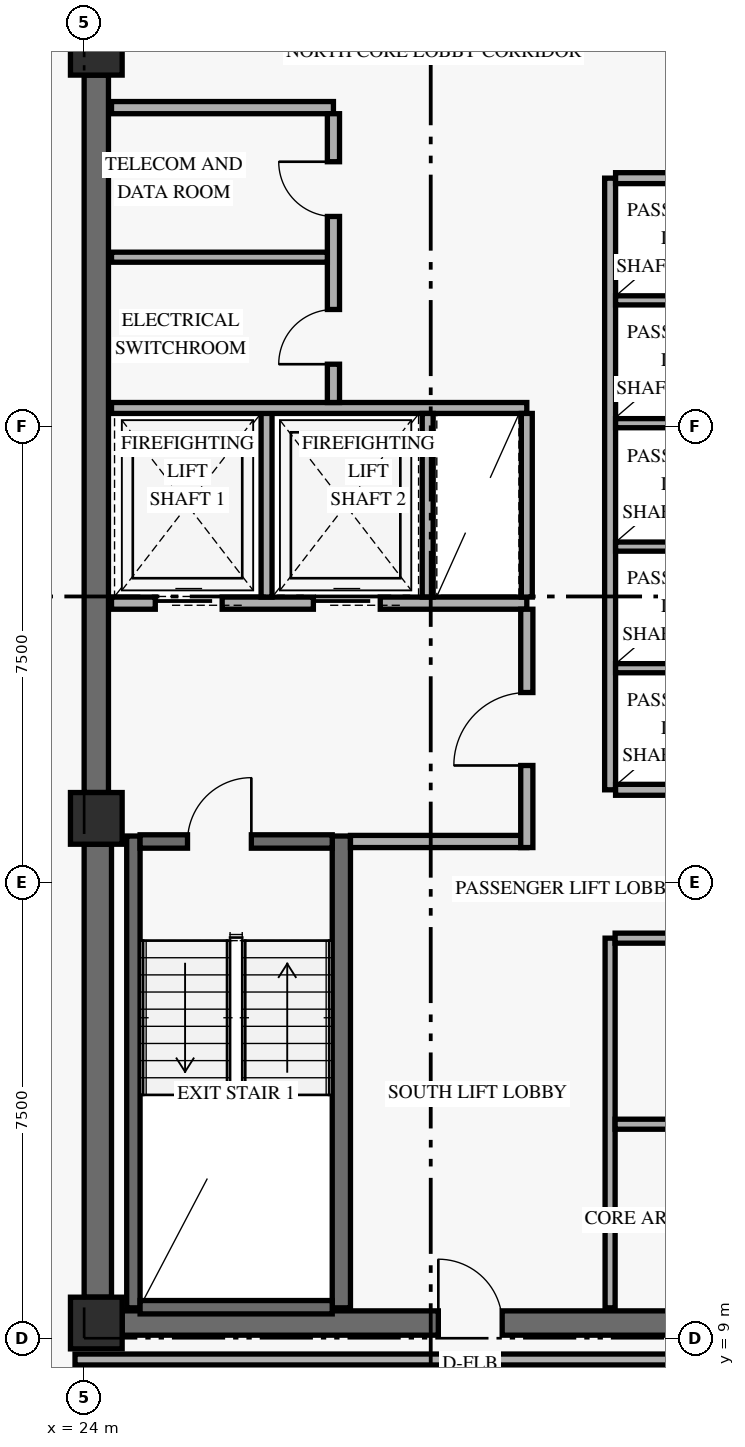
"""IFC4 building model, lengths in metres.
Left out: names, types, materials, properties, quantities, classifications, styles, units other than length and angle.
Written with IfcOpenShell. Run it as: python <this file> out.ifc"""

import sys

from ifc_helpers import new_model, si_unit, direction, frame, frame_2d, origin, origin_2d, place, context, subcontext, project, spatial, rectangle, extrude, element, fill, save


model = new_model("IFC4")
c1 = context("Model", 3, precision=1e-05, world=origin(), true_north=direction((0.0, 1.0)))
c2 = subcontext(c1, "Body", "Model", "MODEL_VIEW")
j1 = project(units=[si_unit("LENGTHUNIT", "METRE"), si_unit("PLANEANGLEUNIT", "RADIAN")], contexts=[c1])
p1 = place(None, origin())
s1 = spatial("IfcSite", under=j1, at=p1, CompositionType="ELEMENT")
p2 = place(p1, origin())
s2 = spatial("IfcBuilding", under=s1, at=p2, CompositionType="ELEMENT")
p3 = place(p2, frame((0.0, 0.0, 109.8)))
s3 = spatial("IfcBuildingStorey", under=s2, at=p3, CompositionType="ELEMENT", Elevation=109.8)
p4 = place(p3, frame((24.225, 9.675, 0.0), z_axis=(0.0, 0.0, 1.0), x_axis=(0.0, 1.0, 0.0)))
e1 = element("IfcWall", 1, at=p4, inside=s3, PredefinedType="SHEAR", context=c2, shape_type="SweptSolid", body=[
    extrude(rectangle(XDim=7.45, YDim=0.45, at=frame_2d((3.725, 0.0))), origin(), (0.0, 0.0, 1.0), 2.749),
])
p5 = place(p3, frame((24.2, 17.975, 0.0), z_axis=(0.0, 0.0, 1.0), x_axis=(0.0, 1.0, 0.0)))
e2 = element("IfcWall", 2, at=p5, inside=s3, PredefinedType="SHEAR", context=c2, shape_type="SweptSolid", body=[
    extrude(rectangle(XDim=11.8, YDim=0.4, at=frame_2d((5.9, 0.0))), origin(), (0.0, 0.0, 1.0), 2.749),
])
p6 = place(p3, frame((24.625, 9.25, 0.0), z_axis=(0.0, 0.0, 1.0), x_axis=(1.0, 0.0, 0.0)))
e3 = element("IfcWall", 3, at=p6, inside=s3, PredefinedType="SHEAR", context=c2, shape_type="SweptSolid", body=[
    extrude(rectangle(XDim=10.15, YDim=0.4, at=frame_2d((5.075, 0.0))), origin(), (0.0, 0.0, 1.0), 3.36),
])
p7 = place(p6, frame((5.2, 0.0, 0.0)))
e4 = element("IfcOpeningElement", 4, at=p7, cuts=e3, PredefinedType="OPENING", context=c2, shape_type="SweptSolid", body=[
    extrude(rectangle(XDim=1.05, YDim=2.15, at=frame_2d((0.525, 1.075))), frame((0.0, 0.21, 0.0), z_axis=(0.0, -1.0, 0.0), x_axis=(1.0, 0.0, 0.0)), (0.0, 0.0, 1.0), 0.42),
])
p8 = place(p3, frame((24.81, 9.5, 0.0), z_axis=(0.0, 0.0, 1.0), x_axis=(0.0, 1.0, 0.0)))
e5 = element("IfcWall", 5, at=p8, inside=s3, PredefinedType="SHEAR", context=c2, shape_type="SweptSolid", body=[
    extrude(rectangle(XDim=7.76, YDim=0.22, at=frame_2d((3.88, 0.0))), origin(), (0.0, 0.0, 1.0), 3.36),
])
p9 = place(p3, frame((28.23, 9.5, 0.0), z_axis=(0.0, 0.0, 1.0), x_axis=(0.0, 1.0, 0.0)))
e6 = element("IfcWall", 6, at=p9, inside=s3, PredefinedType="SHEAR", context=c2, shape_type="SweptSolid", body=[
    extrude(rectangle(XDim=7.76, YDim=0.3, at=frame_2d((3.88, 0.0))), origin(), (0.0, 0.0, 1.0), 3.36),
])
p10 = place(p3, frame((24.92, 9.51, 0.0), z_axis=(0.0, 0.0, 1.0), x_axis=(1.0, 0.0, 0.0)))
e7 = element("IfcWall", 7, at=p10, inside=s3, PredefinedType="SHEAR", context=c2, shape_type="SweptSolid", body=[
    extrude(rectangle(XDim=3.16, YDim=0.22, at=frame_2d((1.58, 0.0))), origin(), (0.0, 0.0, 1.0), 3.36),
])
p11 = place(p3, frame((24.92, 17.17, 0.0), z_axis=(0.0, 0.0, 1.0), x_axis=(1.0, 0.0, 0.0)))
e8 = element("IfcWall", 8, at=p11, inside=s3, PredefinedType="SHEAR", context=c2, shape_type="SweptSolid", body=[
    extrude(rectangle(XDim=3.16, YDim=0.22, at=frame_2d((1.58, 0.0))), origin(), (0.0, 0.0, 1.0), 3.36),
])
p12 = place(p11, frame((0.78, 0.0, 0.0)))
e9 = element("IfcOpeningElement", 9, at=p12, cuts=e8, PredefinedType="OPENING", context=c2, shape_type="SweptSolid", body=[
    extrude(rectangle(XDim=1.05, YDim=2.15, at=frame_2d((0.525, 1.075))), frame((0.0, 0.12, 0.0), z_axis=(0.0, -1.0, 0.0), x_axis=(1.0, 0.0, 0.0)), (0.0, 0.0, 1.0), 0.24),
])
for number, where, z_axis, x_axis in (
    (10, (24.2, 9.25, 0.0), (0.0, 0.0, 1.0), (1.0, 0.0, 0.0)),
    (11, (24.2, 17.55, 0.0), (0.0, 0.0, 1.0), (1.0, 0.0, 0.0)),
    (12, (24.2, 30.2, 0.0), (0.0, 0.0, 1.0), (1.0, 0.0, 0.0)),
):
    element("IfcColumn", number, at=place(p3, frame(where, z_axis=z_axis, x_axis=x_axis)), inside=s3, PredefinedType="COLUMN", context=c2, shape_type="SweptSolid", body=[
        extrude(rectangle(XDim=0.85, YDim=0.85, at=origin_2d()), origin(), (0.0, 0.0, 1.0), 3.6),
    ])
p13 = place(p3, frame((24.45, 21.09, 0.0), z_axis=(0.0, 0.0, 1.0), x_axis=(1.0, 0.0, 0.0)))
e13 = element("IfcWall", 13, at=p13, inside=s3, PredefinedType="STANDARD", context=c2, shape_type="SweptSolid", body=[
    extrude(rectangle(XDim=6.83, YDim=0.2, at=frame_2d((3.415, 0.0))), origin(), (0.0, 0.0, 1.0), 3.36),
])
p14 = place(p13, frame((0.72, 0.0, 0.0)))
e14 = element("IfcOpeningElement", 14, at=p14, cuts=e13, PredefinedType="OPENING", context=c2, shape_type="SweptSolid", body=[
    extrude(rectangle(XDim=1.1, YDim=2.2, at=frame_2d((0.55, 1.1))), frame((0.0, 0.11, 0.0), z_axis=(0.0, -1.0, 0.0), x_axis=(1.0, 0.0, 0.0)), (0.0, 0.0, 1.0), 0.22),
])
p15 = place(p13, frame((3.32, 0.0, 0.0)))
e15 = element("IfcOpeningElement", 15, at=p15, cuts=e13, PredefinedType="OPENING", context=c2, shape_type="SweptSolid", body=[
    extrude(rectangle(XDim=1.1, YDim=2.2, at=frame_2d((0.55, 1.1))), frame((0.0, 0.11, 0.0), z_axis=(0.0, -1.0, 0.0), x_axis=(1.0, 0.0, 0.0)), (0.0, 0.0, 1.0), 0.22),
])
p16 = place(p3, frame((28.38, 17.17, 0.0), z_axis=(0.0, 0.0, 1.0), x_axis=(1.0, 0.0, 0.0)))
e16 = element("IfcWall", 16, at=p16, inside=s3, PredefinedType="STANDARD", context=c2, shape_type="SweptSolid", body=[
    extrude(rectangle(XDim=2.9, YDim=0.2, at=frame_2d((1.45, 0.0))), origin(), (0.0, 0.0, 1.0), 3.36),
])
p17 = place(p3, frame((31.28, 17.07, 0.0), z_axis=(0.0, 0.0, 1.0), x_axis=(0.0, 1.0, 0.0)))
e17 = element("IfcWall", 17, at=p17, inside=s3, PredefinedType="STANDARD", context=c2, shape_type="SweptSolid", body=[
    extrude(rectangle(XDim=3.92, YDim=0.2, at=frame_2d((1.96, 0.0))), origin(), (0.0, 0.0, 1.0), 2.731),
])
p18 = place(p17, frame((1.35, 0.0, 0.0)))
e18 = element("IfcOpeningElement", 18, at=p18, cuts=e17, PredefinedType="OPENING", context=c2, shape_type="SweptSolid", body=[
    extrude(rectangle(XDim=1.2, YDim=2.15, at=frame_2d((0.6, 1.075))), frame((0.0, 0.11, 0.0), z_axis=(0.0, -1.0, 0.0), x_axis=(1.0, 0.0, 0.0)), (0.0, 0.0, 1.0), 0.22),
])
p19 = place(p3, frame((27.0, 21.19, 0.0), z_axis=(0.0, 0.0, 1.0), x_axis=(0.0, 1.0, 0.0)))
e19 = element("IfcWall", 19, at=p19, inside=s3, PredefinedType="STANDARD", context=c2, shape_type="SweptSolid", body=[
    extrude(rectangle(XDim=3.11, YDim=0.18, at=frame_2d((1.555, 0.0))), origin(), (0.0, 0.0, 1.0), 3.36),
])
p20 = place(p3, frame((24.45, 24.3, 0.0), z_axis=(0.0, 0.0, 1.0), x_axis=(1.0, 0.0, 0.0)))
e20 = element("IfcWall", 20, at=p20, inside=s3, PredefinedType="STANDARD", context=c2, shape_type="SweptSolid", body=[
    extrude(rectangle(XDim=6.83, YDim=0.18, at=frame_2d((3.415, 0.0))), origin(), (0.0, 0.0, 1.0), 3.36),
])
for number, where, z_axis, x_axis in (
    (21, (29.65, 21.19, 0.0), (0.0, 0.0, 1.0), (0.0, 1.0, 0.0)),
    (22, (31.28, 21.19, 0.0), (0.0, 0.0, 1.0), (0.0, 1.0, 0.0)),
):
    element("IfcWall", number, at=place(p3, frame(where, z_axis=z_axis, x_axis=x_axis)), inside=s3, PredefinedType="STANDARD", context=c2, shape_type="SweptSolid", body=[
        extrude(rectangle(XDim=3.02, YDim=0.18, at=frame_2d((1.51, 0.0))), origin(), (0.0, 0.0, 1.0), 3.36),
    ])
p21 = place(p3, frame((24.45, 29.24, 0.0), z_axis=(0.0, 0.0, 1.0), x_axis=(1.0, 0.0, 0.0)))
e23 = element("IfcWall", 23, at=p21, inside=s3, PredefinedType="STANDARD", context=c2, shape_type="SweptSolid", body=[
    extrude(rectangle(XDim=3.65, YDim=0.2, at=frame_2d((1.825, 0.0))), origin(), (0.0, 0.0, 1.0), 3.36),
])
p22 = place(p3, frame((28.1, 24.39, 0.0), z_axis=(0.0, 0.0, 1.0), x_axis=(0.0, 1.0, 0.0)))
e24 = element("IfcWall", 24, at=p22, inside=s3, PredefinedType="STANDARD", context=c2, shape_type="SweptSolid", body=[
    extrude(rectangle(XDim=4.75, YDim=0.2, at=frame_2d((2.375, 0.0))), origin(), (0.0, 0.0, 1.0), 3.36),
])
p23 = place(p22, frame((0.63, 0.0, 0.0)))
e25 = element("IfcOpeningElement", 25, at=p23, cuts=e24, PredefinedType="OPENING", context=c2, shape_type="SweptSolid", body=[
    extrude(rectangle(XDim=0.9, YDim=2.1, at=frame_2d((0.45, 1.05))), frame((0.0, 0.11, 0.0), z_axis=(0.0, -1.0, 0.0), x_axis=(1.0, 0.0, 0.0)), (0.0, 0.0, 1.0), 0.22),
])
p24 = place(p22, frame((3.06, 0.0, 0.0)))
e26 = element("IfcOpeningElement", 26, at=p24, cuts=e24, PredefinedType="OPENING", context=c2, shape_type="SweptSolid", body=[
    extrude(rectangle(XDim=0.9, YDim=2.1, at=frame_2d((0.45, 1.05))), frame((0.0, 0.11, 0.0), z_axis=(0.0, -1.0, 0.0), x_axis=(1.0, 0.0, 0.0)), (0.0, 0.0, 1.0), 0.22),
])
p25 = place(p3, frame((24.45, 26.78, 0.0), z_axis=(0.0, 0.0, 1.0), x_axis=(1.0, 0.0, 0.0)))
e27 = element("IfcWall", 27, at=p25, inside=s3, PredefinedType="PARTITIONING", context=c2, shape_type="SweptSolid", body=[
    extrude(rectangle(XDim=3.55, YDim=0.165, at=frame_2d((1.775, 0.0))), origin(), (0.0, 0.0, 1.0), 3.36),
])
p26 = place(p3, frame((32.65, 18.02, 0.0), z_axis=(0.0, 0.0, 1.0), x_axis=(0.0, 1.0, 0.0)))
e28 = element("IfcWall", 28, at=p26, inside=s3, PredefinedType="STANDARD", context=c2, shape_type="SweptSolid", body=[
    extrude(rectangle(XDim=10.06, YDim=0.18, at=frame_2d((5.03, 0.0))), origin(), (0.0, 0.0, 1.0), 3.36),
])
for number, where, z_axis, x_axis in (
    (29, (32.74, 18.02, 0.0), (0.0, 0.0, 1.0), (1.0, 0.0, 0.0)),
    (30, (32.74, 28.08, 0.0), (0.0, 0.0, 1.0), (1.0, 0.0, 0.0)),
):
    element("IfcWall", number, at=place(p3, frame(where, z_axis=z_axis, x_axis=x_axis)), inside=s3, PredefinedType="STANDARD", context=c2, shape_type="SweptSolid", body=[
        extrude(rectangle(XDim=2.26, YDim=0.18, at=frame_2d((1.13, 0.0))), origin(), (0.0, 0.0, 1.0), 3.36),
    ])
for number, where, z_axis, x_axis in (
    (31, (32.74, 20.02, 0.0), (0.0, 0.0, 1.0), (1.0, 0.0, 0.0)),
    (32, (32.74, 22.02, 0.0), (0.0, 0.0, 1.0), (1.0, 0.0, 0.0)),
    (33, (32.74, 24.05, 0.0), (0.0, 0.0, 1.0), (1.0, 0.0, 0.0)),
    (34, (32.74, 26.07, 0.0), (0.0, 0.0, 1.0), (1.0, 0.0, 0.0)),
):
    element("IfcWall", number, at=place(p3, frame(where, z_axis=z_axis, x_axis=x_axis)), inside=s3, PredefinedType="STANDARD", context=c2, shape_type="SweptSolid", body=[
        extrude(rectangle(XDim=2.26, YDim=0.15, at=frame_2d((1.13, 0.0))), origin(), (0.0, 0.0, 1.0), 3.36),
    ])
p27 = place(p3, frame((32.65, 9.5, 0.0), z_axis=(0.0, 0.0, 1.0), x_axis=(0.0, 1.0, 0.0)))
e35 = element("IfcWall", 35, at=p27, inside=s3, PredefinedType="PARTITIONING", context=c2, shape_type="SweptSolid", body=[
    extrude(rectangle(XDim=6.08, YDim=0.165, at=frame_2d((3.04, 0.0))), origin(), (0.0, 0.0, 1.0), 3.36),
])
p28 = place(p3, frame((32.732, 15.58, 0.0), z_axis=(0.0, 0.0, 1.0), x_axis=(1.0, 0.0, 0.0)))
e36 = element("IfcWall", 36, at=p28, inside=s3, PredefinedType="PARTITIONING", context=c2, shape_type="SweptSolid", body=[
    extrude(rectangle(XDim=5.218, YDim=0.165, at=frame_2d((2.609, 0.0))), origin(), (0.0, 0.0, 1.0), 2.731),
])
p29 = place(p28, frame((2.867, 0.0, 0.0)))
e37 = element("IfcOpeningElement", 37, at=p29, cuts=e36, PredefinedType="OPENING", context=c2, shape_type="SweptSolid", body=[
    extrude(rectangle(XDim=0.95, YDim=2.15, at=frame_2d((0.475, 1.075))), frame((0.0, 0.093, 0.0), z_axis=(0.0, -1.0, 0.0), x_axis=(1.0, 0.0, 0.0)), (0.0, 0.0, 1.0), 0.185),
])
p30 = place(p3, frame((32.732, 12.52, 0.0), z_axis=(0.0, 0.0, 1.0), x_axis=(1.0, 0.0, 0.0)))
e38 = element("IfcWall", 38, at=p30, inside=s3, PredefinedType="PARTITIONING", context=c2, shape_type="SweptSolid", body=[
    extrude(rectangle(XDim=5.135, YDim=0.165, at=frame_2d((2.567, 0.0))), origin(), (0.0, 0.0, 1.0), 2.731),
])
p31 = place(p30, frame((2.768, 0.0, 0.0)))
e39 = element("IfcOpeningElement", 39, at=p31, cuts=e38, PredefinedType="OPENING", context=c2, shape_type="SweptSolid", body=[
    extrude(rectangle(XDim=0.9, YDim=2.1, at=frame_2d((0.45, 1.05))), frame((0.0, 0.093, 0.0), z_axis=(0.0, -1.0, 0.0), x_axis=(1.0, 0.0, 0.0)), (0.0, 0.0, 1.0), 0.185),
])
p32 = place(p3, frame((23.85, 8.65, 0.0), z_axis=(0.0, 0.0, 1.0), x_axis=(1.0, 0.0, 0.0)))
e40 = element("IfcWall", 40, at=p32, inside=s3, PredefinedType="STANDARD", context=c2, shape_type="SweptSolid", body=[
    extrude(rectangle(XDim=11.57, YDim=0.18, at=frame_2d((5.785, 0.0))), origin(), (0.0, 0.0, 1.0), 2.731),
])
p33 = place(p12, frame((1.05, 0.0, 0.0), z_axis=(0.0, 0.0, 1.0), x_axis=(-1.0, 0.0, 0.0)))
e41 = element("IfcDoor", 41, at=p33, inside=s3, OperationType="SINGLE_SWING_LEFT", PredefinedType="DOOR", context=c2, shape_type="SweptSolid", body=[
    extrude(rectangle(XDim=1.05, YDim=2.15, at=frame_2d((0.525, 1.075))), frame((0.0, 0.025, 0.0), z_axis=(0.0, -1.0, 0.0), x_axis=(1.0, 0.0, 0.0)), (0.0, 0.0, 1.0), 0.05),
])
fill(e9, e41)
p34 = place(p14, origin())
e42 = element("IfcDoor", 42, at=p34, inside=s3, OperationType="SLIDING_TO_LEFT", PredefinedType="DOOR", context=c2, shape_type="SweptSolid", body=[
    extrude(rectangle(XDim=1.1, YDim=2.2, at=frame_2d((0.55, 1.1))), frame((0.0, 0.025, 0.0), z_axis=(0.0, -1.0, 0.0), x_axis=(1.0, 0.0, 0.0)), (0.0, 0.0, 1.0), 0.05),
])
fill(e14, e42)
p35 = place(p15, origin())
e43 = element("IfcDoor", 43, at=p35, inside=s3, OperationType="SLIDING_TO_LEFT", PredefinedType="DOOR", context=c2, shape_type="SweptSolid", body=[
    extrude(rectangle(XDim=1.1, YDim=2.2, at=frame_2d((0.55, 1.1))), frame((0.0, 0.025, 0.0), z_axis=(0.0, -1.0, 0.0), x_axis=(1.0, 0.0, 0.0)), (0.0, 0.0, 1.0), 0.05),
])
fill(e15, e43)
p36 = place(p18, origin())
e44 = element("IfcDoor", 44, at=p36, inside=s3, OperationType="SINGLE_SWING_LEFT", PredefinedType="DOOR", context=c2, shape_type="SweptSolid", body=[
    extrude(rectangle(XDim=1.2, YDim=2.15, at=frame_2d((0.6, 1.075))), frame((0.0, 0.025, 0.0), z_axis=(0.0, -1.0, 0.0), x_axis=(1.0, 0.0, 0.0)), (0.0, 0.0, 1.0), 0.05),
])
fill(e18, e44)
p37 = place(p23, origin())
e45 = element("IfcDoor", 45, at=p37, inside=s3, OperationType="SINGLE_SWING_LEFT", PredefinedType="DOOR", context=c2, shape_type="SweptSolid", body=[
    extrude(rectangle(XDim=0.9, YDim=2.1, at=frame_2d((0.45, 1.05))), frame((0.0, 0.025, 0.0), z_axis=(0.0, -1.0, 0.0), x_axis=(1.0, 0.0, 0.0)), (0.0, 0.0, 1.0), 0.05),
])
fill(e25, e45)
p38 = place(p24, origin())
e46 = element("IfcDoor", 46, at=p38, inside=s3, OperationType="SINGLE_SWING_RIGHT", PredefinedType="DOOR", context=c2, shape_type="SweptSolid", body=[
    extrude(rectangle(XDim=0.9, YDim=2.1, at=frame_2d((0.45, 1.05))), frame((0.0, 0.025, 0.0), z_axis=(0.0, -1.0, 0.0), x_axis=(1.0, 0.0, 0.0)), (0.0, 0.0, 1.0), 0.05),
])
fill(e26, e46)
p39 = place(p7, origin())
e47 = element("IfcDoor", 47, at=p39, inside=s3, OperationType="SINGLE_SWING_LEFT", PredefinedType="DOOR", context=c2, shape_type="SweptSolid", body=[
    extrude(rectangle(XDim=1.05, YDim=2.15, at=frame_2d((0.525, 1.075))), frame((0.0, 0.025, 0.0), z_axis=(0.0, -1.0, 0.0), x_axis=(1.0, 0.0, 0.0)), (0.0, 0.0, 1.0), 0.05),
])
fill(e4, e47)
save(model, sys.argv[1])
